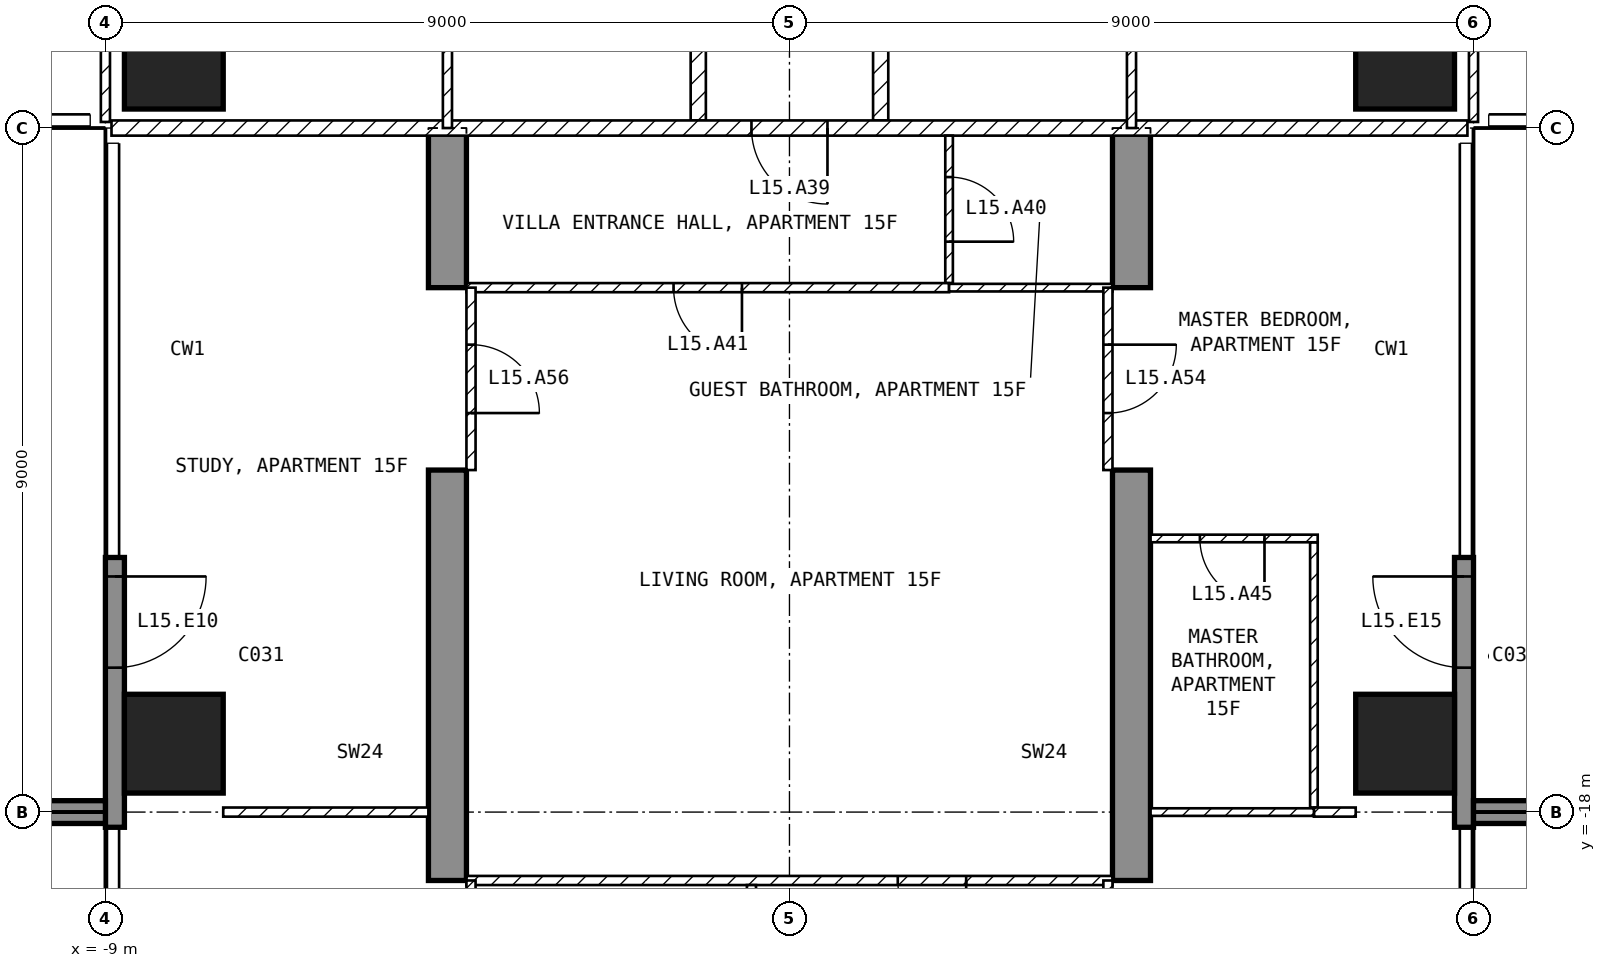
"""IFC4 building model, lengths in metres.
Left out: names, types, materials, properties, quantities, classifications, styles, units other than length and angle.
Written with IfcOpenShell. Run it as: python <this file> out.ifc"""

import sys

from ifc_helpers import new_model, si_unit, direction, frame, frame_2d, origin, origin_2d, place, context, subcontext, project, spatial, polyline, rectangle, outline, extrude, element, fill, save


model = new_model("IFC4")
c1 = context("Model", 3, precision=1e-05, world=origin(), true_north=direction((0.0, 1.0)))
c2 = subcontext(c1, "Body", "Model", "MODEL_VIEW")
j1 = project(units=[si_unit("LENGTHUNIT", "METRE"), si_unit("PLANEANGLEUNIT", "RADIAN")], contexts=[c1])
p1 = place(None, origin())
s1 = spatial("IfcSite", under=j1, at=p1, CompositionType="ELEMENT")
p2 = place(p1, origin())
s2 = spatial("IfcBuilding", under=s1, at=p2, CompositionType="ELEMENT")
p3 = place(p2, frame((0.0, 0.0, 71.5)))
s3 = spatial("IfcBuildingStorey", under=s2, at=p3, CompositionType="ELEMENT", Elevation=71.5)
for number, where, z_axis, x_axis in (
    (1, (-8.1, -17.1, -0.25), (0.0, 0.0, 1.0), (1.0, 0.0, 0.0)),
    (2, (-8.1, -8.1, -0.25), (0.0, 0.0, 1.0), (1.0, 0.0, 0.0)),
    (3, (8.1, -17.1, -0.25), (0.0, 0.0, 1.0), (1.0, 0.0, 0.0)),
    (4, (8.1, -8.1, -0.25), (0.0, 0.0, 1.0), (1.0, 0.0, 0.0)),
):
    element("IfcColumn", number, at=place(p3, frame(where, z_axis=z_axis, x_axis=x_axis)), inside=s3, PredefinedType="COLUMN", context=c2, shape_type="SweptSolid", body=[
        extrude(rectangle(XDim=1.3, YDim=1.3, at=origin_2d()), origin(), (0.0, 0.0, 1.0), 3.5),
    ])
for number, where, z_axis, x_axis in (
    (5, (-4.75, -25.45, -0.25), (1.0, 0.0, 0.0), (0.0, 1.0, 0.0)),
    (6, (4.25, -25.45, -0.25), (1.0, 0.0, 0.0), (0.0, 1.0, 0.0)),
):
    element("IfcWall", number, at=place(p3, frame(where, z_axis=z_axis, x_axis=x_axis)), inside=s3, PredefinedType="SHEAR", context=c2, shape_type="SweptSolid", body=[
        extrude(outline(polyline([(0.0, 0.0), (4.15, 0.0), (4.15, 2.65), (6.55, 2.65), (6.55, 0.0), (11.95, 0.0), (11.95, 2.65), (14.35, 2.65), (14.35, 0.0), (16.45, 0.0), (16.45, 3.5), (0.0, 3.5), (0.0, 0.0)])), origin(), (0.0, 0.0, 1.0), 0.5),
    ])
p4 = place(p3, frame((-8.875, -14.65, 0.0), z_axis=(0.0, 0.0, 1.0), x_axis=(0.0, -1.0, 0.0)))
e7 = element("IfcWall", 7, at=p4, inside=s3, PredefinedType="SOLIDWALL", context=c2, shape_type="SweptSolid", body=[
    extrude(rectangle(XDim=3.55, YDim=0.25, at=frame_2d((1.775, 0.0))), origin(), (0.0, 0.0, 1.0), 3.25),
])
p5 = place(p4, frame((0.25, 0.0, 0.0)))
e8 = element("IfcOpeningElement", 8, at=p5, cuts=e7, PredefinedType="OPENING", context=c2, shape_type="SweptSolid", body=[
    extrude(rectangle(XDim=1.2, YDim=2.4, at=frame_2d((0.6, 1.2))), frame((0.0, 0.135, 0.0), z_axis=(0.0, -1.0, 0.0), x_axis=(1.0, 0.0, 0.0)), (0.0, 0.0, 1.0), 0.27),
])
p6 = place(p3, frame((8.875, -18.2, 0.0), z_axis=(0.0, 0.0, 1.0), x_axis=(0.0, 1.0, 0.0)))
e9 = element("IfcWall", 9, at=p6, inside=s3, PredefinedType="SOLIDWALL", context=c2, shape_type="SweptSolid", body=[
    extrude(rectangle(XDim=3.55, YDim=0.25, at=frame_2d((1.775, 0.0))), origin(), (0.0, 0.0, 1.0), 3.25),
])
p7 = place(p6, frame((2.1, 0.0, 0.0)))
e10 = element("IfcOpeningElement", 10, at=p7, cuts=e9, PredefinedType="OPENING", context=c2, shape_type="SweptSolid", body=[
    extrude(rectangle(XDim=1.2, YDim=2.4, at=frame_2d((0.6, 1.2))), frame((0.0, 0.135, 0.0), z_axis=(0.0, -1.0, 0.0), x_axis=(1.0, 0.0, 0.0)), (0.0, 0.0, 1.0), 0.27),
])
for number, where, z_axis, x_axis in (
    (11, (-9.0, -18.0, 0.0), (0.0, 0.0, 1.0), (-1.0, 0.0, 0.0)),
    (12, (9.0, -18.0, 0.0), (0.0, 0.0, 1.0), (1.0, 0.0, 0.0)),
):
    element("IfcWall", number, at=place(p3, frame(where, z_axis=z_axis, x_axis=x_axis)), inside=s3, PredefinedType="SOLIDWALL", context=c2, shape_type="SweptSolid", body=[
        extrude(rectangle(XDim=2.7, YDim=0.3, at=frame_2d((1.35, 0.0))), origin(), (0.0, 0.0, 1.0), 3.25),
    ])
for number, where, z_axis, x_axis in (
    (13, (1.2, -1.3, 0.0), (0.0, 0.0, 1.0), (0.0, -1.0, 0.0)),
    (14, (-1.2, -8.9, 0.0), (0.0, 0.0, 1.0), (0.0, 1.0, 0.0)),
):
    element("IfcWall", number, at=place(p3, frame(where, z_axis=z_axis, x_axis=x_axis)), inside=s3, PredefinedType="PARTITIONING", context=c2, shape_type="SweptSolid", body=[
        extrude(rectangle(XDim=7.6, YDim=0.2, at=frame_2d((3.8, 0.0))), origin(), (0.0, 0.0, 1.0), 3.25),
    ])
p8 = place(p3, frame((8.92, -9.0, 0.0), z_axis=(0.0, 0.0, 1.0), x_axis=(-1.0, 0.0, 0.0)))
e15 = element("IfcWall", 15, at=p8, inside=s3, PredefinedType="PARTITIONING", context=c2, shape_type="SweptSolid", body=[
    extrude(rectangle(XDim=17.84, YDim=0.2, at=frame_2d((8.92, 0.0))), origin(), (0.0, 0.0, 1.0), 3.25),
])
p9 = place(p8, frame((8.42, 0.0, 0.0)))
e16 = element("IfcOpeningElement", 16, at=p9, cuts=e15, PredefinedType="OPENING", context=c2, shape_type="SweptSolid", body=[
    extrude(rectangle(XDim=1.0, YDim=2.1, at=frame_2d((0.5, 1.05))), frame((0.0, 0.11, 0.0), z_axis=(0.0, -1.0, 0.0), x_axis=(1.0, 0.0, 0.0)), (0.0, 0.0, 1.0), 0.22),
])
p10 = place(p3, frame((9.0, -8.92, 0.0), z_axis=(0.0, 0.0, 1.0), x_axis=(0.0, 1.0, 0.0)))
e17 = element("IfcWall", 17, at=p10, inside=s3, PredefinedType="PARTITIONING", context=c2, shape_type="SweptSolid", body=[
    extrude(rectangle(XDim=7.62, YDim=0.12, at=frame_2d((3.81, 0.0))), origin(), (0.0, 0.0, 1.0), 3.25),
])
p11 = place(p10, frame((2.67, 0.0, 0.0)))
e18 = element("IfcOpeningElement", 18, at=p11, cuts=e17, PredefinedType="OPENING", context=c2, shape_type="SweptSolid", body=[
    extrude(rectangle(XDim=0.9, YDim=2.1, at=frame_2d((0.45, 1.05))), frame((0.0, 0.07, 0.0), z_axis=(0.0, -1.0, 0.0), x_axis=(1.0, 0.0, 0.0)), (0.0, 0.0, 1.0), 0.14),
])
p12 = place(p3, frame((4.5, -9.0, 0.0), z_axis=(0.0, 0.0, 1.0), x_axis=(0.0, 1.0, 0.0)))
e19 = element("IfcWall", 19, at=p12, inside=s3, PredefinedType="PARTITIONING", context=c2, shape_type="SweptSolid", body=[
    extrude(rectangle(XDim=7.7, YDim=0.12, at=frame_2d((3.85, 0.0))), origin(), (0.0, 0.0, 1.0), 3.25),
])
p13 = place(p12, frame((3.4, 0.0, 0.0)))
e20 = element("IfcOpeningElement", 20, at=p13, cuts=e19, PredefinedType="OPENING", context=c2, shape_type="SweptSolid", body=[
    extrude(rectangle(XDim=0.9, YDim=2.1, at=frame_2d((0.45, 1.05))), frame((0.0, 0.07, 0.0), z_axis=(0.0, -1.0, 0.0), x_axis=(1.0, 0.0, 0.0)), (0.0, 0.0, 1.0), 0.14),
])
p14 = place(p3, frame((-9.0, -1.3, 0.0), z_axis=(0.0, 0.0, 1.0), x_axis=(0.0, -1.0, 0.0)))
e21 = element("IfcWall", 21, at=p14, inside=s3, PredefinedType="PARTITIONING", context=c2, shape_type="SweptSolid", body=[
    extrude(rectangle(XDim=7.62, YDim=0.12, at=frame_2d((3.81, 0.0))), origin(), (0.0, 0.0, 1.0), 3.25),
])
p15 = place(p14, frame((0.85, 0.0, 0.0)))
e22 = element("IfcOpeningElement", 22, at=p15, cuts=e21, PredefinedType="OPENING", context=c2, shape_type="SweptSolid", body=[
    extrude(rectangle(XDim=0.9, YDim=2.1, at=frame_2d((0.45, 1.05))), frame((0.0, 0.07, 0.0), z_axis=(0.0, -1.0, 0.0), x_axis=(1.0, 0.0, 0.0)), (0.0, 0.0, 1.0), 0.14),
])
p16 = place(p3, frame((-4.5, -1.3, 0.0), z_axis=(0.0, 0.0, 1.0), x_axis=(0.0, -1.0, 0.0)))
e23 = element("IfcWall", 23, at=p16, inside=s3, PredefinedType="PARTITIONING", context=c2, shape_type="SweptSolid", body=[
    extrude(rectangle(XDim=7.7, YDim=0.12, at=frame_2d((3.85, 0.0))), origin(), (0.0, 0.0, 1.0), 3.25),
])
p17 = place(p16, frame((1.84, 0.0, 0.0)))
e24 = element("IfcOpeningElement", 24, at=p17, cuts=e23, PredefinedType="OPENING", context=c2, shape_type="SweptSolid", body=[
    extrude(rectangle(XDim=0.9, YDim=2.1, at=frame_2d((0.45, 1.05))), frame((0.0, 0.07, 0.0), z_axis=(0.0, -1.0, 0.0), x_axis=(1.0, 0.0, 0.0)), (0.0, 0.0, 1.0), 0.14),
])
p18 = place(p3, frame((2.1, -9.1, 0.0), z_axis=(0.0, 0.0, 1.0), x_axis=(0.0, -1.0, 0.0)))
e25 = element("IfcWall", 25, at=p18, inside=s3, PredefinedType="PARTITIONING", context=c2, shape_type="SweptSolid", body=[
    extrude(rectangle(XDim=1.94, YDim=0.1, at=frame_2d((0.97, 0.0))), origin(), (0.0, 0.0, 1.0), 3.25),
])
p19 = place(p18, frame((0.545, 0.0, 0.0)))
e26 = element("IfcOpeningElement", 26, at=p19, cuts=e25, PredefinedType="OPENING", context=c2, shape_type="SweptSolid", body=[
    extrude(rectangle(XDim=0.85, YDim=2.1, at=frame_2d((0.425, 1.05))), frame((0.0, 0.06, 0.0), z_axis=(0.0, -1.0, 0.0), x_axis=(1.0, 0.0, 0.0)), (0.0, 0.0, 1.0), 0.12),
])
p20 = place(p3, frame((2.1, -11.1, 0.0), z_axis=(0.0, 0.0, 1.0), x_axis=(-1.0, 0.0, 0.0)))
e27 = element("IfcWall", 27, at=p20, inside=s3, PredefinedType="PARTITIONING", context=c2, shape_type="SweptSolid", body=[
    extrude(rectangle(XDim=6.35, YDim=0.12, at=frame_2d((3.175, 0.0))), origin(), (0.0, 0.0, 1.0), 3.25),
])
p21 = place(p20, frame((2.725, 0.0, 0.0)))
e28 = element("IfcOpeningElement", 28, at=p21, cuts=e27, PredefinedType="OPENING", context=c2, shape_type="SweptSolid", body=[
    extrude(rectangle(XDim=0.9, YDim=2.1, at=frame_2d((0.45, 1.05))), frame((0.0, 0.07, 0.0), z_axis=(0.0, -1.0, 0.0), x_axis=(1.0, 0.0, 0.0)), (0.0, 0.0, 1.0), 0.14),
])
p22 = place(p3, frame((4.25, -11.1, 0.0), z_axis=(0.0, 0.0, 1.0), x_axis=(-1.0, 0.0, 0.0)))
e29 = element("IfcWall", 29, at=p22, inside=s3, PredefinedType="PARTITIONING", context=c2, shape_type="SweptSolid", body=[
    extrude(rectangle(XDim=2.15, YDim=0.1, at=frame_2d((1.075, 0.0))), origin(), (0.0, 0.0, 1.0), 3.25),
])
p23 = place(p3, frame((4.25, -18.9, 0.0), z_axis=(0.0, 0.0, 1.0), x_axis=(-1.0, 0.0, 0.0)))
e30 = element("IfcWall", 30, at=p23, inside=s3, PredefinedType="PARTITIONING", context=c2, shape_type="SweptSolid", body=[
    extrude(rectangle(XDim=8.5, YDim=0.12, at=frame_2d((4.25, 0.0))), origin(), (0.0, 0.0, 1.0), 3.25),
])
p24 = place(p23, frame((1.925, 0.0, 0.0)))
e31 = element("IfcOpeningElement", 31, at=p24, cuts=e30, PredefinedType="OPENING", context=c2, shape_type="SweptSolid", body=[
    extrude(rectangle(XDim=0.9, YDim=2.1, at=frame_2d((0.45, 1.05))), frame((0.0, 0.07, 0.0), z_axis=(0.0, -1.0, 0.0), x_axis=(1.0, 0.0, 0.0)), (0.0, 0.0, 1.0), 0.14),
])
p25 = place(p3, frame((-0.5, -23.34, 0.0), z_axis=(0.0, 0.0, 1.0), x_axis=(0.0, 1.0, 0.0)))
e32 = element("IfcWall", 32, at=p25, inside=s3, PredefinedType="PARTITIONING", context=c2, shape_type="SweptSolid", body=[
    extrude(rectangle(XDim=4.38, YDim=0.12, at=frame_2d((2.19, 0.0))), origin(), (0.0, 0.0, 1.0), 3.25),
])
p26 = place(p25, frame((1.74, 0.0, 0.0)))
e33 = element("IfcOpeningElement", 33, at=p26, cuts=e32, PredefinedType="OPENING", context=c2, shape_type="SweptSolid", body=[
    extrude(rectangle(XDim=0.9, YDim=2.1, at=frame_2d((0.45, 1.05))), frame((0.0, 0.07, 0.0), z_axis=(0.0, -1.0, 0.0), x_axis=(1.0, 0.0, 0.0)), (0.0, 0.0, 1.0), 0.14),
])
p27 = place(p3, frame((6.9, -17.94, 0.0), z_axis=(0.0, 0.0, 1.0), x_axis=(0.0, 1.0, 0.0)))
e34 = element("IfcWall", 34, at=p27, inside=s3, PredefinedType="PARTITIONING", context=c2, shape_type="SweptSolid", body=[
    extrude(rectangle(XDim=3.49, YDim=0.1, at=frame_2d((1.745, 0.0))), origin(), (0.0, 0.0, 1.0), 3.25),
])
p28 = place(p3, frame((6.95, -14.4, 0.0), z_axis=(0.0, 0.0, 1.0), x_axis=(-1.0, 0.0, 0.0)))
e35 = element("IfcWall", 35, at=p28, inside=s3, PredefinedType="PARTITIONING", context=c2, shape_type="SweptSolid", body=[
    extrude(rectangle(XDim=2.2, YDim=0.1, at=frame_2d((1.1, 0.0))), origin(), (0.0, 0.0, 1.0), 3.25),
])
p29 = place(p28, frame((0.7, 0.0, 0.0)))
e36 = element("IfcOpeningElement", 36, at=p29, cuts=e35, PredefinedType="OPENING", context=c2, shape_type="SweptSolid", body=[
    extrude(rectangle(XDim=0.85, YDim=2.1, at=frame_2d((0.425, 1.05))), frame((0.0, 0.06, 0.0), z_axis=(0.0, -1.0, 0.0), x_axis=(1.0, 0.0, 0.0)), (0.0, 0.0, 1.0), 0.12),
])
p30 = place(p3, frame((7.45, -18.0, 0.0), z_axis=(0.0, 0.0, 1.0), x_axis=(-1.0, 0.0, 0.0)))
e37 = element("IfcWall", 37, at=p30, inside=s3, PredefinedType="PARTITIONING", context=c2, shape_type="SweptSolid", body=[
    extrude(rectangle(XDim=0.55, YDim=0.12, at=frame_2d((0.275, 0.0))), origin(), (0.0, 0.0, 1.0), 3.25),
])
p31 = place(p3, frame((6.9, -18.0, 0.0), z_axis=(0.0, 0.0, 1.0), x_axis=(-1.0, 0.0, 0.0)))
e38 = element("IfcWall", 38, at=p31, inside=s3, PredefinedType="PARTITIONING", context=c2, shape_type="SweptSolid", body=[
    extrude(rectangle(XDim=2.15, YDim=0.1, at=frame_2d((1.075, 0.0))), origin(), (0.0, 0.0, 1.0), 3.25),
])
p32 = place(p3, frame((-4.75, -18.0, 0.0), z_axis=(0.0, 0.0, 1.0), x_axis=(-1.0, 0.0, 0.0)))
e39 = element("IfcWall", 39, at=p32, inside=s3, PredefinedType="PARTITIONING", context=c2, shape_type="SweptSolid", body=[
    extrude(rectangle(XDim=2.7, YDim=0.12, at=frame_2d((1.35, 0.0))), origin(), (0.0, 0.0, 1.0), 3.25),
])
p33 = place(p3, frame((4.19, -11.1, 0.0), z_axis=(0.0, 0.0, 1.0), x_axis=(0.0, -1.0, 0.0)))
e40 = element("IfcWall", 40, at=p33, inside=s3, PredefinedType="PARTITIONING", context=c2, shape_type="SweptSolid", body=[
    extrude(rectangle(XDim=2.4, YDim=0.12, at=frame_2d((1.2, 0.0))), origin(), (0.0, 0.0, 1.0), 2.4),
])
p34 = place(p33, frame((0.75, 0.0, 0.0)))
e41 = element("IfcOpeningElement", 41, at=p34, cuts=e40, PredefinedType="OPENING", context=c2, shape_type="SweptSolid", body=[
    extrude(rectangle(XDim=0.9, YDim=2.1, at=frame_2d((0.45, 1.05))), frame((0.0, 0.07, 0.0), z_axis=(0.0, -1.0, 0.0), x_axis=(1.0, 0.0, 0.0)), (0.0, 0.0, 1.0), 0.14),
])
p35 = place(p3, frame((4.19, -18.9, 0.0), z_axis=(0.0, 0.0, 1.0), x_axis=(0.0, -1.0, 0.0)))
e42 = element("IfcWall", 42, at=p35, inside=s3, PredefinedType="PARTITIONING", context=c2, shape_type="SweptSolid", body=[
    extrude(rectangle(XDim=2.4, YDim=0.12, at=frame_2d((1.2, 0.0))), origin(), (0.0, 0.0, 1.0), 2.4),
])
p36 = place(p35, frame((0.75, 0.0, 0.0)))
e43 = element("IfcOpeningElement", 43, at=p36, cuts=e42, PredefinedType="OPENING", context=c2, shape_type="SweptSolid", body=[
    extrude(rectangle(XDim=0.9, YDim=2.1, at=frame_2d((0.45, 1.05))), frame((0.0, 0.07, 0.0), z_axis=(0.0, -1.0, 0.0), x_axis=(1.0, 0.0, 0.0)), (0.0, 0.0, 1.0), 0.14),
])
p37 = place(p3, frame((-4.19, -11.1, 0.0), z_axis=(0.0, 0.0, 1.0), x_axis=(0.0, -1.0, 0.0)))
e44 = element("IfcWall", 44, at=p37, inside=s3, PredefinedType="PARTITIONING", context=c2, shape_type="SweptSolid", body=[
    extrude(rectangle(XDim=2.4, YDim=0.12, at=frame_2d((1.2, 0.0))), origin(), (0.0, 0.0, 1.0), 2.4),
])
p38 = place(p37, frame((0.75, 0.0, 0.0)))
e45 = element("IfcOpeningElement", 45, at=p38, cuts=e44, PredefinedType="OPENING", context=c2, shape_type="SweptSolid", body=[
    extrude(rectangle(XDim=0.9, YDim=2.1, at=frame_2d((0.45, 1.05))), frame((0.0, 0.07, 0.0), z_axis=(0.0, -1.0, 0.0), x_axis=(1.0, 0.0, 0.0)), (0.0, 0.0, 1.0), 0.14),
])
p39 = place(p3, frame((-4.19, -18.9, 0.0), z_axis=(0.0, 0.0, 1.0), x_axis=(0.0, -1.0, 0.0)))
e46 = element("IfcWall", 46, at=p39, inside=s3, PredefinedType="PARTITIONING", context=c2, shape_type="SweptSolid", body=[
    extrude(rectangle(XDim=2.4, YDim=0.12, at=frame_2d((1.2, 0.0))), origin(), (0.0, 0.0, 1.0), 2.4),
])
p40 = place(p39, frame((0.75, 0.0, 0.0)))
e47 = element("IfcOpeningElement", 47, at=p40, cuts=e46, PredefinedType="OPENING", context=c2, shape_type="SweptSolid", body=[
    extrude(rectangle(XDim=0.9, YDim=2.1, at=frame_2d((0.45, 1.05))), frame((0.0, 0.07, 0.0), z_axis=(0.0, -1.0, 0.0), x_axis=(1.0, 0.0, 0.0)), (0.0, 0.0, 1.0), 0.14),
])
p41 = place(p5, origin())
e48 = element("IfcDoor", 48, at=p41, inside=s3, OperationType="SINGLE_SWING_LEFT", PredefinedType="DOOR", context=c2, shape_type="SweptSolid", body=[
    extrude(rectangle(XDim=1.2, YDim=2.4, at=frame_2d((0.6, 1.2))), frame((0.0, 0.025, 0.0), z_axis=(0.0, -1.0, 0.0), x_axis=(1.0, 0.0, 0.0)), (0.0, 0.0, 1.0), 0.05),
])
fill(e8, e48)
p42 = place(p7, origin())
e49 = element("IfcDoor", 49, at=p42, inside=s3, OperationType="SINGLE_SWING_RIGHT", PredefinedType="DOOR", context=c2, shape_type="SweptSolid", body=[
    extrude(rectangle(XDim=1.2, YDim=2.4, at=frame_2d((0.6, 1.2))), frame((0.0, 0.025, 0.0), z_axis=(0.0, -1.0, 0.0), x_axis=(1.0, 0.0, 0.0)), (0.0, 0.0, 1.0), 0.05),
])
fill(e10, e49)
p43 = place(p9, origin())
e50 = element("IfcDoor", 50, at=p43, inside=s3, OperationType="SINGLE_SWING_LEFT", PredefinedType="DOOR", context=c2, shape_type="SweptSolid", body=[
    extrude(rectangle(XDim=1.0, YDim=2.1, at=frame_2d((0.5, 1.05))), frame((0.0, 0.025, 0.0), z_axis=(0.0, -1.0, 0.0), x_axis=(1.0, 0.0, 0.0)), (0.0, 0.0, 1.0), 0.05),
])
fill(e16, e50)
p44 = place(p19, origin())
e51 = element("IfcDoor", 51, at=p44, inside=s3, OperationType="SINGLE_SWING_RIGHT", PredefinedType="DOOR", context=c2, shape_type="SweptSolid", body=[
    extrude(rectangle(XDim=0.85, YDim=2.1, at=frame_2d((0.425, 1.05))), frame((0.0, 0.025, 0.0), z_axis=(0.0, -1.0, 0.0), x_axis=(1.0, 0.0, 0.0)), (0.0, 0.0, 1.0), 0.05),
])
fill(e26, e51)
p45 = place(p21, origin())
e52 = element("IfcDoor", 52, at=p45, inside=s3, OperationType="SINGLE_SWING_LEFT", PredefinedType="DOOR", context=c2, shape_type="SweptSolid", body=[
    extrude(rectangle(XDim=0.9, YDim=2.1, at=frame_2d((0.45, 1.05))), frame((0.0, 0.025, 0.0), z_axis=(0.0, -1.0, 0.0), x_axis=(1.0, 0.0, 0.0)), (0.0, 0.0, 1.0), 0.05),
])
fill(e28, e52)
p46 = place(p24, origin())
e53 = element("IfcDoor", 53, at=p46, inside=s3, OperationType="SINGLE_SWING_LEFT", PredefinedType="DOOR", context=c2, shape_type="SweptSolid", body=[
    extrude(rectangle(XDim=0.9, YDim=2.1, at=frame_2d((0.45, 1.05))), frame((0.0, 0.025, 0.0), z_axis=(0.0, -1.0, 0.0), x_axis=(1.0, 0.0, 0.0)), (0.0, 0.0, 1.0), 0.05),
])
fill(e31, e53)
p47 = place(p29, origin())
e54 = element("IfcDoor", 54, at=p47, inside=s3, OperationType="SINGLE_SWING_LEFT", PredefinedType="DOOR", context=c2, shape_type="SweptSolid", body=[
    extrude(rectangle(XDim=0.85, YDim=2.1, at=frame_2d((0.425, 1.05))), frame((0.0, 0.025, 0.0), z_axis=(0.0, -1.0, 0.0), x_axis=(1.0, 0.0, 0.0)), (0.0, 0.0, 1.0), 0.05),
])
fill(e36, e54)
p48 = place(p34, origin())
e55 = element("IfcDoor", 55, at=p48, inside=s3, OperationType="SINGLE_SWING_LEFT", PredefinedType="DOOR", context=c2, shape_type="SweptSolid", body=[
    extrude(rectangle(XDim=0.9, YDim=2.1, at=frame_2d((0.45, 1.05))), frame((0.0, 0.025, 0.0), z_axis=(0.0, -1.0, 0.0), x_axis=(1.0, 0.0, 0.0)), (0.0, 0.0, 1.0), 0.05),
])
fill(e41, e55)
p49 = place(p38, origin())
e56 = element("IfcDoor", 56, at=p49, inside=s3, OperationType="SINGLE_SWING_RIGHT", PredefinedType="DOOR", context=c2, shape_type="SweptSolid", body=[
    extrude(rectangle(XDim=0.9, YDim=2.1, at=frame_2d((0.45, 1.05))), frame((0.0, 0.025, 0.0), z_axis=(0.0, -1.0, 0.0), x_axis=(1.0, 0.0, 0.0)), (0.0, 0.0, 1.0), 0.05),
])
fill(e45, e56)
save(model, sys.argv[1])
